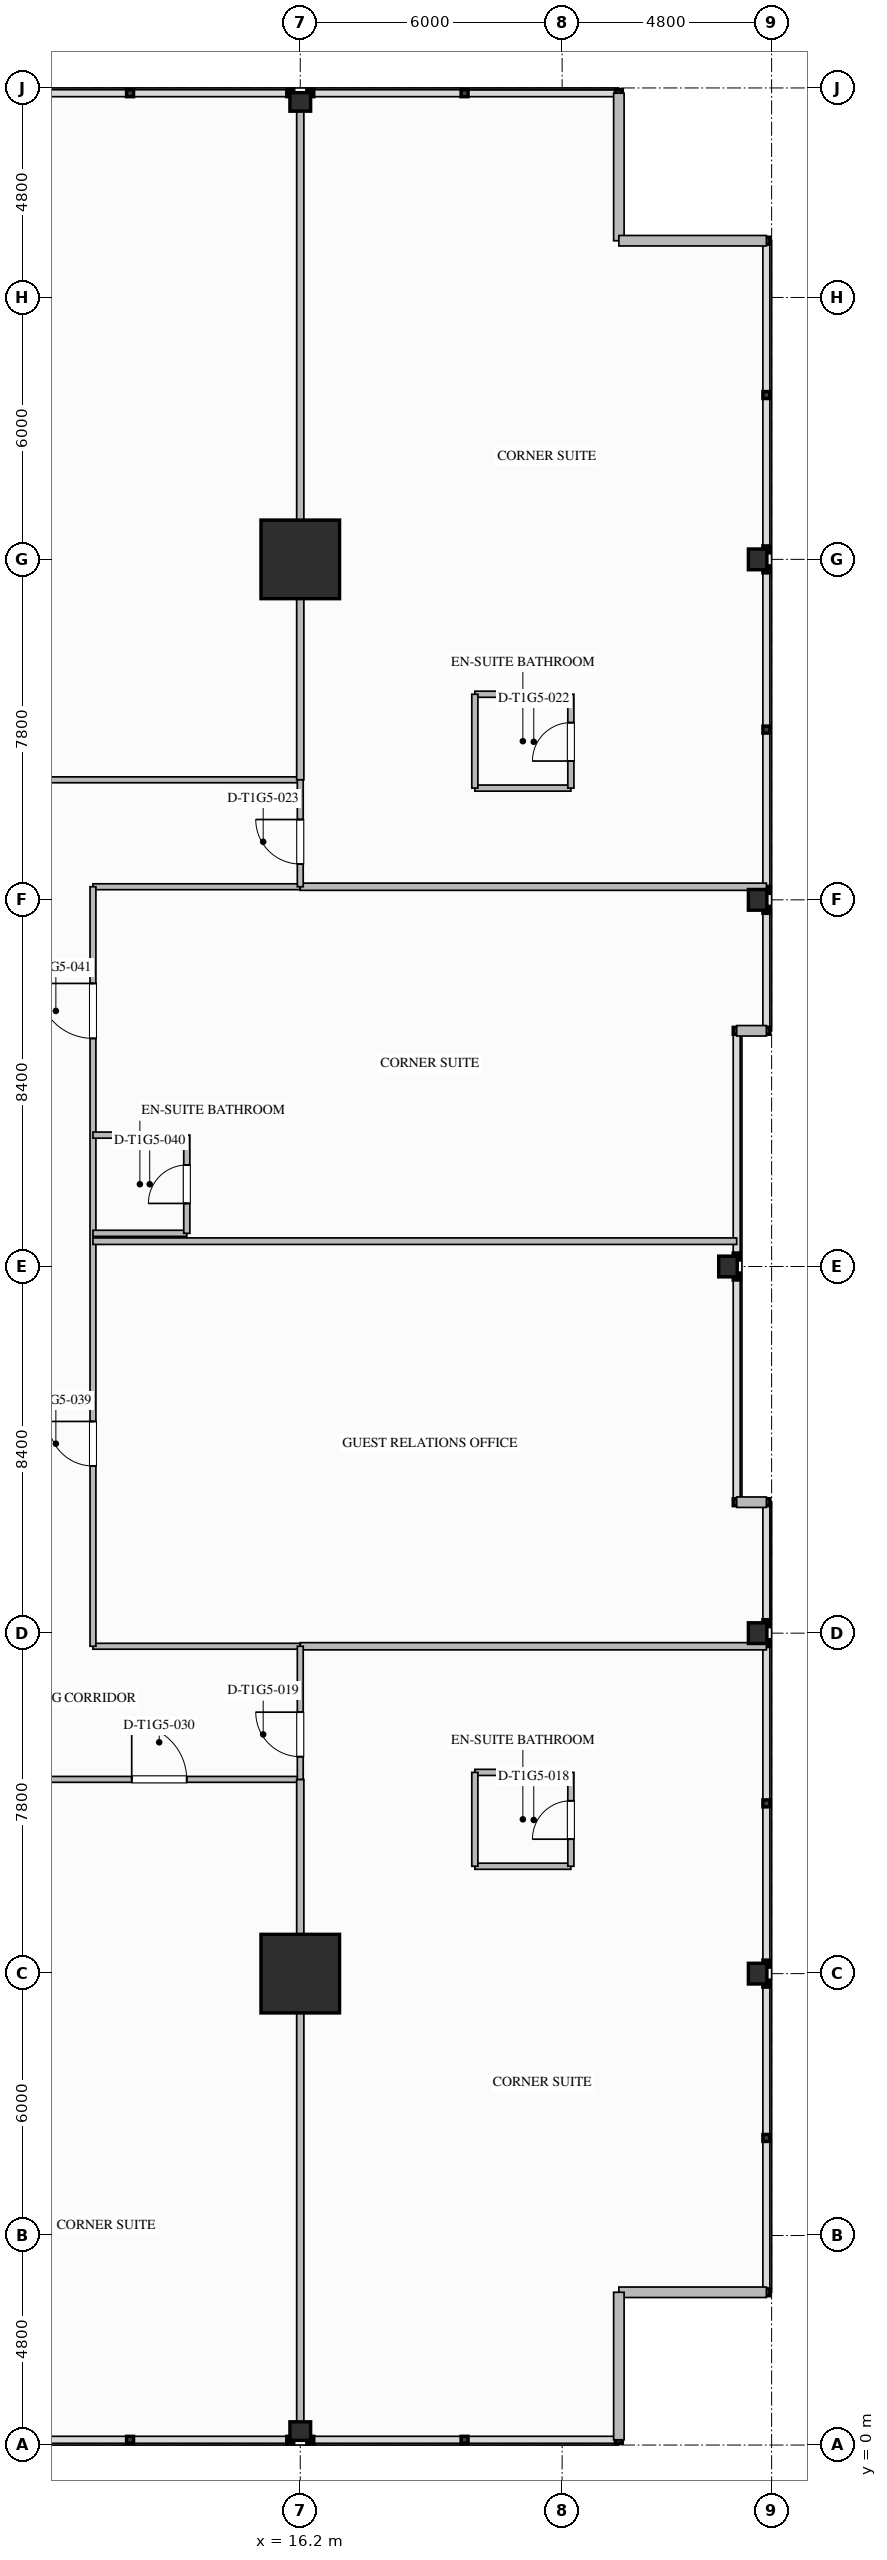
"""IFC4 building model, lengths in metres.
Left out: names, types, materials, properties, quantities, classifications, styles, units other than length and angle.
Written with IfcOpenShell. Run it as: python <this file> out.ifc"""

import sys

from ifc_helpers import new_model, si_unit, direction, frame, frame_2d, origin, origin_2d, place, context, subcontext, project, spatial, rectangle, i_section, extrude, element, fill, save


model = new_model("IFC4")
c1 = context("Model", 3, precision=1e-05, world=origin(), true_north=direction((0.0, 1.0)))
c2 = subcontext(c1, "Body", "Model", "MODEL_VIEW")
j1 = project(units=[si_unit("LENGTHUNIT", "METRE"), si_unit("PLANEANGLEUNIT", "RADIAN")], contexts=[c1])
p1 = place(None, origin())
s1 = spatial("IfcSite", under=j1, at=p1, CompositionType="ELEMENT")
p2 = place(p1, origin())
s2 = spatial("IfcBuilding", under=s1, at=p2, CompositionType="ELEMENT")
p3 = place(p2, frame((0.0, 0.0, 75.2)))
s3 = spatial("IfcBuildingStorey", under=s2, at=p3, CompositionType="ELEMENT", Elevation=75.2)
for number, where, z_axis, x_axis in (
    (1, (16.2, 10.8, 0.0), (0.0, 0.0, 1.0), (1.0, 0.0, 0.0)),
    (2, (16.2, 43.2, 0.0), (0.0, 0.0, 1.0), (1.0, 0.0, 0.0)),
):
    element("IfcColumn", number, at=place(p3, frame(where, z_axis=z_axis, x_axis=x_axis)), inside=s3, PredefinedType="COLUMN", context=c2, shape_type="SweptSolid", body=[
        extrude(rectangle(XDim=1.8, YDim=1.8, at=origin_2d()), origin(), (0.0, 0.0, 1.0), 3.5),
    ])
for number, where, z_axis, x_axis in (
    (3, (26.68, 10.8, 0.0), (0.0, 0.0, 1.0), (1.0, 0.0, 0.0)),
    (4, (26.68, 18.6, 0.0), (0.0, 0.0, 1.0), (1.0, 0.0, 0.0)),
    (5, (26.0, 27.0, 0.0), (0.0, 0.0, 1.0), (1.0, 0.0, 0.0)),
    (6, (26.68, 35.4, 0.0), (0.0, 0.0, 1.0), (1.0, 0.0, 0.0)),
    (7, (26.68, 43.2, 0.0), (0.0, 0.0, 1.0), (1.0, 0.0, 0.0)),
    (8, (16.2, 0.32, 0.0), (0.0, 0.0, 1.0), (0.0, 1.0, 0.0)),
    (9, (16.2, 53.68, 0.0), (0.0, 0.0, 1.0), (0.0, 1.0, 0.0)),
):
    element("IfcColumn", number, at=place(p3, frame(where, z_axis=z_axis, x_axis=x_axis)), inside=s3, PredefinedType="COLUMN", context=c2, shape_type="SweptSolid", body=[
        extrude(i_section(OverallWidth=0.424, OverallDepth=0.474, WebThickness=0.048, FlangeThickness=0.077, FilletRadius=0.03, at=origin_2d()), origin(), (0.0, 0.0, 1.0), 3.497),
    ])
for number, where, z_axis, x_axis in (
    (10, (23.5, 53.88, 0.0), (0.0, 0.0, 1.0), (0.0, -1.0, 0.0)),
    (11, (23.5, 50.5, 0.0), (0.0, 0.0, 1.0), (1.0, 0.0, 0.0)),
    (12, (26.88, 3.5, 0.0), (0.0, 0.0, 1.0), (-1.0, 0.0, 0.0)),
    (13, (23.5, 3.5, 0.0), (0.0, 0.0, 1.0), (0.0, -1.0, 0.0)),
):
    element("IfcWall", number, at=place(p3, frame(where, z_axis=z_axis, x_axis=x_axis)), inside=s3, PredefinedType="STANDARD", context=c2, shape_type="SweptSolid", body=[
        extrude(rectangle(XDim=3.38, YDim=0.24, at=frame_2d((1.69, 0.0))), origin(), (0.0, 0.0, 1.0), 3.24),
    ])
for number, where, z_axis, x_axis in (
    (14, (26.88, 32.4, 0.0), (0.0, 0.0, 1.0), (-1.0, 0.0, 0.0)),
    (15, (26.2, 21.6, 0.0), (0.0, 0.0, 1.0), (1.0, 0.0, 0.0)),
):
    element("IfcWall", number, at=place(p3, frame(where, z_axis=z_axis, x_axis=x_axis)), inside=s3, PredefinedType="STANDARD", context=c2, shape_type="SweptSolid", body=[
        extrude(rectangle(XDim=0.68, YDim=0.24, at=frame_2d((0.34, 0.0))), origin(), (0.0, 0.0, 1.0), 3.24),
    ])
p4 = place(p3, frame((-16.2, 15.25, 0.0), z_axis=(0.0, 0.0, 1.0), x_axis=(1.0, 0.0, 0.0)))
e16 = element("IfcWall", 16, at=p4, inside=s3, PredefinedType="PARTITIONING", context=c2, shape_type="SweptSolid", body=[
    extrude(rectangle(XDim=32.4, YDim=0.135, at=frame_2d((16.2, 0.0))), origin(), (0.0, 0.0, 1.0), 3.24),
])
p5 = place(p4, frame((1.331, 0.0, 0.0)))
e17 = element("IfcOpeningElement", 17, at=p5, cuts=e16, PredefinedType="OPENING", context=c2, shape_type="SweptSolid", body=[
    extrude(rectangle(XDim=1.26, YDim=2.2, at=frame_2d((0.63, 1.1))), frame((0.0, 0.077, 0.0), z_axis=(0.0, -1.0, 0.0), x_axis=(1.0, 0.0, 0.0)), (0.0, 0.0, 1.0), 0.155),
])
p6 = place(p4, frame((10.925, 0.0, 0.0)))
e18 = element("IfcOpeningElement", 18, at=p6, cuts=e16, PredefinedType="OPENING", context=c2, shape_type="SweptSolid", body=[
    extrude(rectangle(XDim=1.02, YDim=2.15, at=frame_2d((0.51, 1.075))), frame((0.0, 0.077, 0.0), z_axis=(0.0, -1.0, 0.0), x_axis=(1.0, 0.0, 0.0)), (0.0, 0.0, 1.0), 0.155),
])
p7 = place(p4, frame((18.167, 0.0, 0.0)))
e19 = element("IfcOpeningElement", 19, at=p7, cuts=e16, PredefinedType="OPENING", context=c2, shape_type="SweptSolid", body=[
    extrude(rectangle(XDim=1.26, YDim=2.2, at=frame_2d((0.63, 1.1))), frame((0.0, 0.077, 0.0), z_axis=(0.0, -1.0, 0.0), x_axis=(1.0, 0.0, 0.0)), (0.0, 0.0, 1.0), 0.155),
])
p8 = place(p4, frame((28.538, 0.0, 0.0)))
e20 = element("IfcOpeningElement", 20, at=p8, cuts=e16, PredefinedType="OPENING", context=c2, shape_type="SweptSolid", body=[
    extrude(rectangle(XDim=1.26, YDim=2.2, at=frame_2d((0.63, 1.1))), frame((0.0, 0.077, 0.0), z_axis=(0.0, -1.0, 0.0), x_axis=(1.0, 0.0, 0.0)), (0.0, 0.0, 1.0), 0.155),
])
p9 = place(p3, frame((-16.2, 38.15, 0.0), z_axis=(0.0, 0.0, 1.0), x_axis=(1.0, 0.0, 0.0)))
e21 = element("IfcWall", 21, at=p9, inside=s3, PredefinedType="PARTITIONING", context=c2, shape_type="SweptSolid", body=[
    extrude(rectangle(XDim=32.4, YDim=0.135, at=frame_2d((16.2, 0.0))), origin(), (0.0, 0.0, 1.0), 3.24),
])
p10 = place(p9, frame((5.175, 0.0, 0.0)))
e22 = element("IfcOpeningElement", 22, at=p10, cuts=e21, PredefinedType="OPENING", context=c2, shape_type="SweptSolid", body=[
    extrude(rectangle(XDim=1.26, YDim=2.2, at=frame_2d((0.63, 1.1))), frame((0.0, 0.077, 0.0), z_axis=(0.0, -1.0, 0.0), x_axis=(1.0, 0.0, 0.0)), (0.0, 0.0, 1.0), 0.155),
])
p11 = place(p9, frame((22.71, 0.0, 0.0)))
e23 = element("IfcOpeningElement", 23, at=p11, cuts=e21, PredefinedType="OPENING", context=c2, shape_type="SweptSolid", body=[
    extrude(rectangle(XDim=1.02, YDim=2.15, at=frame_2d((0.51, 1.075))), frame((0.0, 0.077, 0.0), z_axis=(0.0, -1.0, 0.0), x_axis=(1.0, 0.0, 0.0)), (0.0, 0.0, 1.0), 0.155),
])
for number, where, z_axis, x_axis in (
    (24, (11.45, 18.3, 0.0), (0.0, 0.0, 1.0), (1.0, 0.0, 0.0)),
    (25, (11.45, 35.7, 0.0), (0.0, 0.0, 1.0), (1.0, 0.0, 0.0)),
):
    element("IfcWall", number, at=place(p3, frame(where, z_axis=z_axis, x_axis=x_axis)), inside=s3, PredefinedType="PARTITIONING", context=c2, shape_type="SweptSolid", body=[
        extrude(rectangle(XDim=4.75, YDim=0.135, at=frame_2d((2.375, 0.0))), origin(), (0.0, 0.0, 1.0), 3.24),
    ])
p12 = place(p3, frame((11.45, 18.3, 0.0), z_axis=(0.0, 0.0, 1.0), x_axis=(0.0, 1.0, 0.0)))
e26 = element("IfcWall", 26, at=p12, inside=s3, PredefinedType="PARTITIONING", context=c2, shape_type="SweptSolid", body=[
    extrude(rectangle(XDim=17.4, YDim=0.135, at=frame_2d((8.7, 0.0))), origin(), (0.0, 0.0, 1.0), 3.24),
])
p13 = place(p12, frame((4.13, 0.0, 0.0)))
e27 = element("IfcOpeningElement", 27, at=p13, cuts=e26, PredefinedType="OPENING", context=c2, shape_type="SweptSolid", body=[
    extrude(rectangle(XDim=1.02, YDim=2.15, at=frame_2d((0.51, 1.075))), frame((0.0, 0.077, 0.0), z_axis=(0.0, -1.0, 0.0), x_axis=(1.0, 0.0, 0.0)), (0.0, 0.0, 1.0), 0.155),
])
p14 = place(p12, frame((13.925, 0.0, 0.0)))
e28 = element("IfcOpeningElement", 28, at=p14, cuts=e26, PredefinedType="OPENING", context=c2, shape_type="SweptSolid", body=[
    extrude(rectangle(XDim=1.26, YDim=2.2, at=frame_2d((0.63, 1.1))), frame((0.0, 0.077, 0.0), z_axis=(0.0, -1.0, 0.0), x_axis=(1.0, 0.0, 0.0)), (0.0, 0.0, 1.0), 0.155),
])
p15 = place(p3, frame((16.2, 0.12, 0.0), z_axis=(0.0, 0.0, 1.0), x_axis=(0.0, 1.0, 0.0)))
e29 = element("IfcWall", 29, at=p15, inside=s3, PredefinedType="PARTITIONING", context=c2, shape_type="SweptSolid", body=[
    extrude(rectangle(XDim=15.13, YDim=0.165, at=frame_2d((7.565, 0.0))), origin(), (0.0, 0.0, 1.0), 2.452),
])
p16 = place(p3, frame((16.2, 38.15, 0.0), z_axis=(0.0, 0.0, 1.0), x_axis=(0.0, 1.0, 0.0)))
e30 = element("IfcWall", 30, at=p16, inside=s3, PredefinedType="PARTITIONING", context=c2, shape_type="SweptSolid", body=[
    extrude(rectangle(XDim=15.73, YDim=0.165, at=frame_2d((7.865, 0.0))), origin(), (0.0, 0.0, 1.0), 2.452),
])
for number, where, z_axis, x_axis in (
    (31, (16.2, 18.3, 0.0), (0.0, 0.0, 1.0), (1.0, 0.0, 0.0)),
    (32, (16.2, 35.7, 0.0), (0.0, 0.0, 1.0), (1.0, 0.0, 0.0)),
):
    element("IfcWall", number, at=place(p3, frame(where, z_axis=z_axis, x_axis=x_axis)), inside=s3, PredefinedType="PARTITIONING", context=c2, shape_type="SweptSolid", body=[
        extrude(rectangle(XDim=10.68, YDim=0.165, at=frame_2d((5.34, 0.0))), origin(), (0.0, 0.0, 1.0), 2.452),
    ])
p17 = place(p3, frame((16.2, 15.25, 0.0), z_axis=(0.0, 0.0, 1.0), x_axis=(0.0, 1.0, 0.0)))
e33 = element("IfcWall", 33, at=p17, inside=s3, PredefinedType="PARTITIONING", context=c2, shape_type="SweptSolid", body=[
    extrude(rectangle(XDim=3.05, YDim=0.135, at=frame_2d((1.525, 0.0))), origin(), (0.0, 0.0, 1.0), 2.452),
])
p18 = place(p17, frame((0.52, 0.0, 0.0)))
e34 = element("IfcOpeningElement", 34, at=p18, cuts=e33, PredefinedType="OPENING", context=c2, shape_type="SweptSolid", body=[
    extrude(rectangle(XDim=1.02, YDim=2.15, at=frame_2d((0.51, 1.075))), frame((0.0, 0.077, 0.0), z_axis=(0.0, -1.0, 0.0), x_axis=(1.0, 0.0, 0.0)), (0.0, 0.0, 1.0), 0.155),
])
p19 = place(p3, frame((16.2, 35.7, 0.0), z_axis=(0.0, 0.0, 1.0), x_axis=(0.0, 1.0, 0.0)))
e35 = element("IfcWall", 35, at=p19, inside=s3, PredefinedType="PARTITIONING", context=c2, shape_type="SweptSolid", body=[
    extrude(rectangle(XDim=2.45, YDim=0.135, at=frame_2d((1.225, 0.0))), origin(), (0.0, 0.0, 1.0), 2.452),
])
p20 = place(p19, frame((0.52, 0.0, 0.0)))
e36 = element("IfcOpeningElement", 36, at=p20, cuts=e35, PredefinedType="OPENING", context=c2, shape_type="SweptSolid", body=[
    extrude(rectangle(XDim=1.02, YDim=2.15, at=frame_2d((0.51, 1.075))), frame((0.0, 0.077, 0.0), z_axis=(0.0, -1.0, 0.0), x_axis=(1.0, 0.0, 0.0)), (0.0, 0.0, 1.0), 0.155),
])
for number, where, z_axis, x_axis in (
    (37, (20.2, 13.26, 0.0), (0.0, 0.0, 1.0), (1.0, 0.0, 0.0)),
    (38, (20.2, 15.41, 0.0), (0.0, 0.0, 1.0), (1.0, 0.0, 0.0)),
):
    element("IfcWall", number, at=place(p3, frame(where, z_axis=z_axis, x_axis=x_axis)), inside=s3, PredefinedType="PLUMBINGWALL", context=c2, shape_type="SweptSolid", body=[
        extrude(rectangle(XDim=2.2, YDim=0.14, at=frame_2d((1.1, 0.0))), origin(), (0.0, 0.0, 1.0), 3.24),
    ])
p21 = place(p3, frame((20.2, 13.26, 0.0), z_axis=(0.0, 0.0, 1.0), x_axis=(0.0, 1.0, 0.0)))
e39 = element("IfcWall", 39, at=p21, inside=s3, PredefinedType="PLUMBINGWALL", context=c2, shape_type="SweptSolid", body=[
    extrude(rectangle(XDim=2.15, YDim=0.14, at=frame_2d((1.075, 0.0))), origin(), (0.0, 0.0, 1.0), 3.24),
])
p22 = place(p3, frame((22.4, 13.26, 0.0), z_axis=(0.0, 0.0, 1.0), x_axis=(0.0, 1.0, 0.0)))
e40 = element("IfcWall", 40, at=p22, inside=s3, PredefinedType="PLUMBINGWALL", context=c2, shape_type="SweptSolid", body=[
    extrude(rectangle(XDim=2.15, YDim=0.14, at=frame_2d((1.075, 0.0))), origin(), (0.0, 0.0, 1.0), 3.24),
])
p23 = place(p22, frame((0.62, 0.0, 0.0)))
e41 = element("IfcOpeningElement", 41, at=p23, cuts=e40, PredefinedType="OPENING", context=c2, shape_type="SweptSolid", body=[
    extrude(rectangle(XDim=0.88, YDim=2.1, at=frame_2d((0.44, 1.05))), frame((0.0, 0.08, 0.0), z_axis=(0.0, -1.0, 0.0), x_axis=(1.0, 0.0, 0.0)), (0.0, 0.0, 1.0), 0.16),
])
for number, where, z_axis, x_axis in (
    (42, (20.2, 37.96, 0.0), (0.0, 0.0, 1.0), (1.0, 0.0, 0.0)),
    (43, (20.2, 40.11, 0.0), (0.0, 0.0, 1.0), (1.0, 0.0, 0.0)),
):
    element("IfcWall", number, at=place(p3, frame(where, z_axis=z_axis, x_axis=x_axis)), inside=s3, PredefinedType="PLUMBINGWALL", context=c2, shape_type="SweptSolid", body=[
        extrude(rectangle(XDim=2.2, YDim=0.14, at=frame_2d((1.1, 0.0))), origin(), (0.0, 0.0, 1.0), 3.24),
    ])
p24 = place(p3, frame((20.2, 37.96, 0.0), z_axis=(0.0, 0.0, 1.0), x_axis=(0.0, 1.0, 0.0)))
e44 = element("IfcWall", 44, at=p24, inside=s3, PredefinedType="PLUMBINGWALL", context=c2, shape_type="SweptSolid", body=[
    extrude(rectangle(XDim=2.15, YDim=0.14, at=frame_2d((1.075, 0.0))), origin(), (0.0, 0.0, 1.0), 3.24),
])
p25 = place(p3, frame((22.4, 37.96, 0.0), z_axis=(0.0, 0.0, 1.0), x_axis=(0.0, 1.0, 0.0)))
e45 = element("IfcWall", 45, at=p25, inside=s3, PredefinedType="PLUMBINGWALL", context=c2, shape_type="SweptSolid", body=[
    extrude(rectangle(XDim=2.15, YDim=0.14, at=frame_2d((1.075, 0.0))), origin(), (0.0, 0.0, 1.0), 3.24),
])
p26 = place(p25, frame((0.62, 0.0, 0.0)))
e46 = element("IfcOpeningElement", 46, at=p26, cuts=e45, PredefinedType="OPENING", context=c2, shape_type="SweptSolid", body=[
    extrude(rectangle(XDim=0.88, YDim=2.1, at=frame_2d((0.44, 1.05))), frame((0.0, 0.08, 0.0), z_axis=(0.0, -1.0, 0.0), x_axis=(1.0, 0.0, 0.0)), (0.0, 0.0, 1.0), 0.16),
])
p27 = place(p3, frame((11.45, 27.58, 0.0), z_axis=(0.0, 0.0, 1.0), x_axis=(1.0, 0.0, 0.0)))
e47 = element("IfcWall", 47, at=p27, inside=s3, PredefinedType="PARTITIONING", context=c2, shape_type="SweptSolid", body=[
    extrude(rectangle(XDim=14.75, YDim=0.15, at=frame_2d((7.375, 0.0))), origin(), (0.0, 0.0, 1.0), 3.24),
])
for number, where, z_axis, x_axis in (
    (48, (11.45, 27.76, 0.0), (0.0, 0.0, 1.0), (1.0, 0.0, 0.0)),
    (49, (11.45, 30.01, 0.0), (0.0, 0.0, 1.0), (1.0, 0.0, 0.0)),
):
    element("IfcWall", number, at=place(p3, frame(where, z_axis=z_axis, x_axis=x_axis)), inside=s3, PredefinedType="PLUMBINGWALL", context=c2, shape_type="SweptSolid", body=[
        extrude(rectangle(XDim=2.15, YDim=0.14, at=frame_2d((1.075, 0.0))), origin(), (0.0, 0.0, 1.0), 3.24),
    ])
p28 = place(p3, frame((13.6, 27.76, 0.0), z_axis=(0.0, 0.0, 1.0), x_axis=(0.0, 1.0, 0.0)))
e50 = element("IfcWall", 50, at=p28, inside=s3, PredefinedType="PLUMBINGWALL", context=c2, shape_type="SweptSolid", body=[
    extrude(rectangle(XDim=2.25, YDim=0.14, at=frame_2d((1.125, 0.0))), origin(), (0.0, 0.0, 1.0), 3.24),
])
p29 = place(p28, frame((0.685, 0.0, 0.0)))
e51 = element("IfcOpeningElement", 51, at=p29, cuts=e50, PredefinedType="OPENING", context=c2, shape_type="SweptSolid", body=[
    extrude(rectangle(XDim=0.88, YDim=2.1, at=frame_2d((0.44, 1.05))), frame((0.0, 0.08, 0.0), z_axis=(0.0, -1.0, 0.0), x_axis=(1.0, 0.0, 0.0)), (0.0, 0.0, 1.0), 0.16),
])
p30 = place(p23, origin())
e52 = element("IfcDoor", 52, at=p30, inside=s3, OperationType="SINGLE_SWING_LEFT", PredefinedType="DOOR", context=c2, shape_type="SweptSolid", body=[
    extrude(rectangle(XDim=0.88, YDim=2.1, at=frame_2d((0.44, 1.05))), frame((0.0, 0.025, 0.0), z_axis=(0.0, -1.0, 0.0), x_axis=(1.0, 0.0, 0.0)), (0.0, 0.0, 1.0), 0.05),
])
fill(e41, e52)
p31 = place(p18, origin())
e53 = element("IfcDoor", 53, at=p31, inside=s3, OperationType="SINGLE_SWING_RIGHT", PredefinedType="DOOR", context=c2, shape_type="SweptSolid", body=[
    extrude(rectangle(XDim=1.02, YDim=2.15, at=frame_2d((0.51, 1.075))), frame((0.0, 0.025, 0.0), z_axis=(0.0, -1.0, 0.0), x_axis=(1.0, 0.0, 0.0)), (0.0, 0.0, 1.0), 0.05),
])
fill(e34, e53)
p32 = place(p26, origin())
e54 = element("IfcDoor", 54, at=p32, inside=s3, OperationType="SINGLE_SWING_LEFT", PredefinedType="DOOR", context=c2, shape_type="SweptSolid", body=[
    extrude(rectangle(XDim=0.88, YDim=2.1, at=frame_2d((0.44, 1.05))), frame((0.0, 0.025, 0.0), z_axis=(0.0, -1.0, 0.0), x_axis=(1.0, 0.0, 0.0)), (0.0, 0.0, 1.0), 0.05),
])
fill(e46, e54)
p33 = place(p20, origin())
e55 = element("IfcDoor", 55, at=p33, inside=s3, OperationType="SINGLE_SWING_RIGHT", PredefinedType="DOOR", context=c2, shape_type="SweptSolid", body=[
    extrude(rectangle(XDim=1.02, YDim=2.15, at=frame_2d((0.51, 1.075))), frame((0.0, 0.025, 0.0), z_axis=(0.0, -1.0, 0.0), x_axis=(1.0, 0.0, 0.0)), (0.0, 0.0, 1.0), 0.05),
])
fill(e36, e55)
p34 = place(p8, origin())
e56 = element("IfcDoor", 56, at=p34, inside=s3, OperationType="SINGLE_SWING_LEFT", PredefinedType="DOOR", context=c2, shape_type="SweptSolid", body=[
    extrude(rectangle(XDim=1.26, YDim=2.2, at=frame_2d((0.63, 1.1))), frame((0.0, 0.025, 0.0), z_axis=(0.0, -1.0, 0.0), x_axis=(1.0, 0.0, 0.0)), (0.0, 0.0, 1.0), 0.05),
])
fill(e20, e56)
p35 = place(p13, origin())
e57 = element("IfcDoor", 57, at=p35, inside=s3, OperationType="SINGLE_SWING_RIGHT", PredefinedType="DOOR", context=c2, shape_type="SweptSolid", body=[
    extrude(rectangle(XDim=1.02, YDim=2.15, at=frame_2d((0.51, 1.075))), frame((0.0, 0.025, 0.0), z_axis=(0.0, -1.0, 0.0), x_axis=(1.0, 0.0, 0.0)), (0.0, 0.0, 1.0), 0.05),
])
fill(e27, e57)
p36 = place(p29, origin())
e58 = element("IfcDoor", 58, at=p36, inside=s3, OperationType="SINGLE_SWING_LEFT", PredefinedType="DOOR", context=c2, shape_type="SweptSolid", body=[
    extrude(rectangle(XDim=0.88, YDim=2.1, at=frame_2d((0.44, 1.05))), frame((0.0, 0.025, 0.0), z_axis=(0.0, -1.0, 0.0), x_axis=(1.0, 0.0, 0.0)), (0.0, 0.0, 1.0), 0.05),
])
fill(e51, e58)
p37 = place(p14, origin())
e59 = element("IfcDoor", 59, at=p37, inside=s3, OperationType="SINGLE_SWING_RIGHT", PredefinedType="DOOR", context=c2, shape_type="SweptSolid", body=[
    extrude(rectangle(XDim=1.26, YDim=2.2, at=frame_2d((0.63, 1.1))), frame((0.0, 0.025, 0.0), z_axis=(0.0, -1.0, 0.0), x_axis=(1.0, 0.0, 0.0)), (0.0, 0.0, 1.0), 0.05),
])
fill(e28, e59)
save(model, sys.argv[1])
